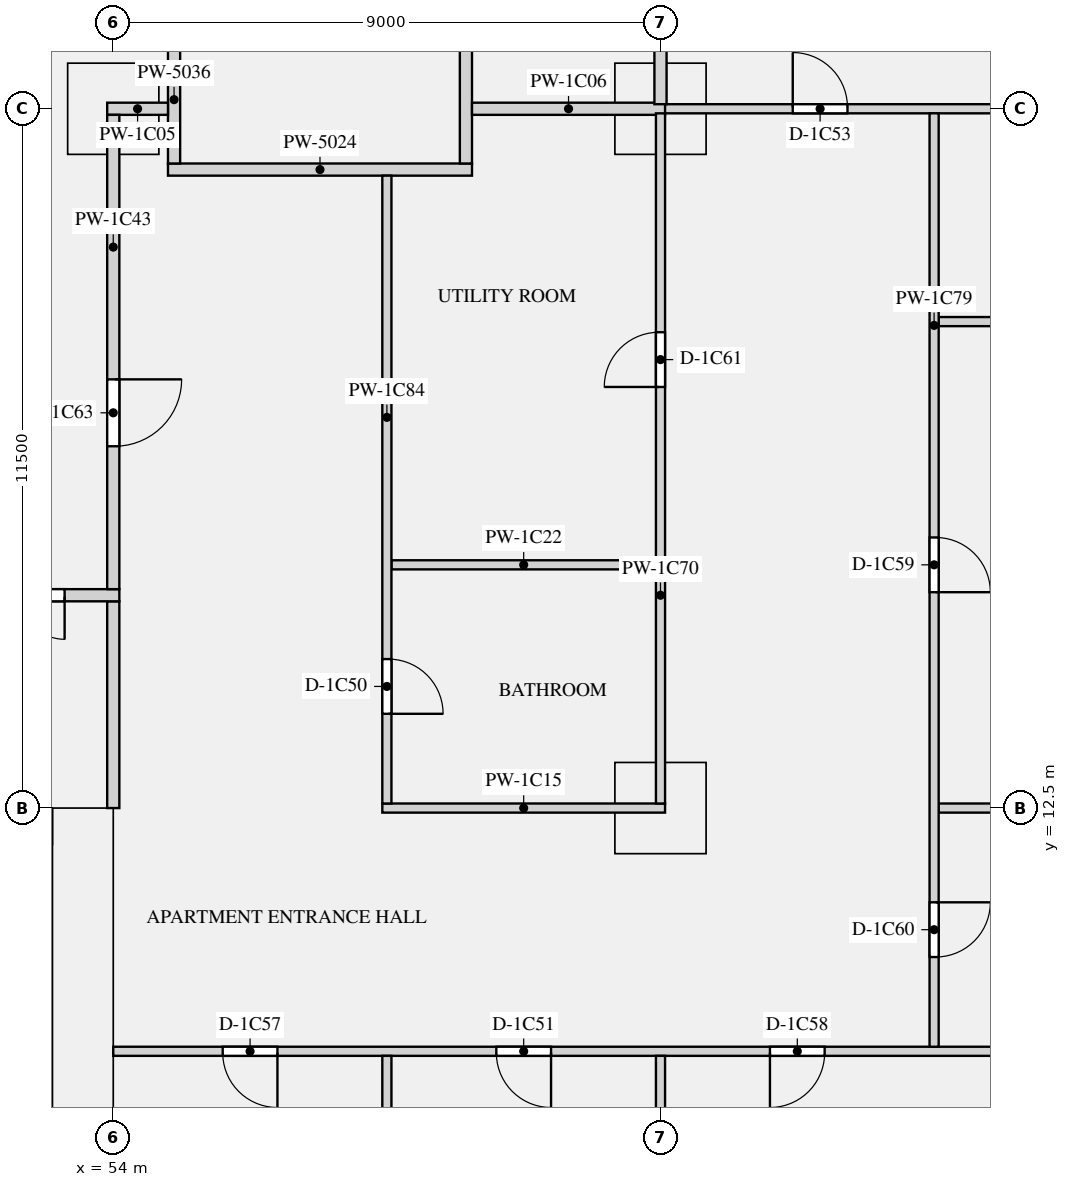
"""IFC4 building model, lengths in metres.
Left out: names, types, materials, properties, quantities, classifications, styles, units other than length and angle.
Written with IfcOpenShell. Run it as: python <this file> out.ifc"""

import sys

from ifc_helpers import new_model, si_unit, direction, frame, frame_2d, origin, origin_2d, place, context, subcontext, project, spatial, rectangle, extrude, element, fill, save


model = new_model("IFC4")
c1 = context("Model", 3, precision=1e-05, world=origin(), true_north=direction((0.0, 1.0)))
c2 = subcontext(c1, "Body", "Model", "MODEL_VIEW")
j1 = project(units=[si_unit("LENGTHUNIT", "METRE"), si_unit("PLANEANGLEUNIT", "RADIAN")], contexts=[c1])
p1 = place(None, origin())
s1 = spatial("IfcSite", under=j1, at=p1, CompositionType="ELEMENT")
p2 = place(p1, origin())
s2 = spatial("IfcBuilding", under=s1, at=p2, CompositionType="ELEMENT")
p3 = place(p2, frame((0.0, 0.0, 38.4)))
s3 = spatial("IfcBuildingStorey", under=s2, at=p3, CompositionType="ELEMENT", Elevation=38.4)
for number, where, z_axis, x_axis in (
    (1, (54.0, 24.0, 0.0), (0.0, 0.0, 1.0), (1.0, 0.0, 0.0)),
    (2, (63.0, 24.0, 0.0), (0.0, 0.0, 1.0), (1.0, 0.0, 0.0)),
    (3, (63.0, 12.5, 0.0), (0.0, 0.0, 1.0), (1.0, 0.0, 0.0)),
):
    element("IfcColumn", number, at=place(p3, frame(where, z_axis=z_axis, x_axis=x_axis)), inside=s3, PredefinedType="COLUMN", context=c2, shape_type="SweptSolid", body=[
        extrude(rectangle(XDim=1.5, YDim=1.5, at=origin_2d()), origin(), (0.0, 0.0, 1.0), 3.15),
    ])
p4 = place(p3, frame((53.5, 0.0, 0.0), z_axis=(0.0, 0.0, 1.0), x_axis=(0.0, 1.0, 0.0)))
e4 = element("IfcWall", 4, at=p4, inside=s3, PredefinedType="SHEAR", context=c2, shape_type="SweptSolid", body=[
    extrude(rectangle(XDim=12.5, YDim=1.0, at=frame_2d((6.25, 0.0))), origin(), (0.0, 0.0, 1.0), 3.15),
])
p5 = place(p3, frame((54.9, 23.0, 0.0), z_axis=(0.0, 0.0, 1.0), x_axis=(1.0, 0.0, 0.0)))
e5 = element("IfcWall", 5, at=p5, inside=s3, PredefinedType="PARTITIONING", context=c2, shape_type="SweptSolid", body=[
    extrude(rectangle(XDim=5.0, YDim=0.2, at=frame_2d((2.5, 0.0))), origin(), (0.0, 0.0, 1.0), 2.83),
])
p6 = place(p3, frame((54.0, 12.5, 0.0), z_axis=(0.0, 0.0, 1.0), x_axis=(0.0, 1.0, 0.0)))
e6 = element("IfcWall", 6, at=p6, inside=s3, PredefinedType="PARTITIONING", context=c2, shape_type="SweptSolid", body=[
    extrude(rectangle(XDim=3.4, YDim=0.2, at=frame_2d((1.7, 0.0))), origin(), (0.0, 0.0, 1.0), 2.83),
])
p7 = place(p3, frame((55.0, 23.1, 0.0), z_axis=(0.0, 0.0, 1.0), x_axis=(0.0, 1.0, 0.0)))
e7 = element("IfcWall", 7, at=p7, inside=s3, PredefinedType="PARTITIONING", context=c2, shape_type="SweptSolid", body=[
    extrude(rectangle(XDim=3.8, YDim=0.2, at=frame_2d((1.9, 0.0))), origin(), (0.0, 0.0, 1.0), 2.83),
])
p8 = place(p7, frame((2.1, 0.0, 0.0)))
e8 = element("IfcOpeningElement", 8, at=p8, cuts=e7, PredefinedType="OPENING", context=c2, shape_type="SweptSolid", body=[
    extrude(rectangle(XDim=1.2, YDim=2.1, at=frame_2d((0.6, 1.05))), frame((0.0, 0.11, 0.0), z_axis=(0.0, -1.0, 0.0), x_axis=(1.0, 0.0, 0.0)), (0.0, 0.0, 1.0), 0.22),
])
p9 = place(p3, frame((59.8, 23.1, 0.0), z_axis=(0.0, 0.0, 1.0), x_axis=(0.0, 1.0, 0.0)))
e9 = element("IfcWall", 9, at=p9, inside=s3, PredefinedType="PARTITIONING", context=c2, shape_type="SweptSolid", body=[
    extrude(rectangle(XDim=3.9, YDim=0.2, at=frame_2d((1.95, 0.0))), origin(), (0.0, 0.0, 1.0), 2.83),
])
p10 = place(p3, frame((62.925, 24.0, 0.0), z_axis=(0.0, 0.0, 1.0), x_axis=(1.0, 0.0, 0.0)))
e10 = element("IfcWall", 10, at=p10, inside=s3, PredefinedType="PARTITIONING", context=c2, shape_type="SweptSolid", body=[
    extrude(rectangle(XDim=10.275, YDim=0.15, at=frame_2d((5.137, 0.0))), origin(), (0.0, 0.0, 1.0), 2.83),
])
p11 = place(p10, frame((2.25, 0.0, 0.0)))
e11 = element("IfcOpeningElement", 11, at=p11, cuts=e10, PredefinedType="OPENING", context=c2, shape_type="SweptSolid", body=[
    extrude(rectangle(XDim=0.9, YDim=2.1, at=frame_2d((0.45, 1.05))), frame((0.0, 0.085, 0.0), z_axis=(0.0, -1.0, 0.0), x_axis=(1.0, 0.0, 0.0)), (0.0, 0.0, 1.0), 0.17),
])
p12 = place(p3, frame((53.9, 24.0, 0.0), z_axis=(0.0, 0.0, 1.0), x_axis=(1.0, 0.0, 0.0)))
e12 = element("IfcWall", 12, at=p12, inside=s3, PredefinedType="PARTITIONING", context=c2, shape_type="SweptSolid", body=[
    extrude(rectangle(XDim=1.0, YDim=0.2, at=frame_2d((0.5, 0.0))), origin(), (0.0, 0.0, 1.0), 2.83),
])
p13 = place(p3, frame((59.9, 24.0, 0.0), z_axis=(0.0, 0.0, 1.0), x_axis=(1.0, 0.0, 0.0)))
e13 = element("IfcWall", 13, at=p13, inside=s3, PredefinedType="PARTITIONING", context=c2, shape_type="SweptSolid", body=[
    extrude(rectangle(XDim=3.175, YDim=0.2, at=frame_2d((1.587, 0.0))), origin(), (0.0, 0.0, 1.0), 2.83),
])
p14 = place(p3, frame((54.0, 8.5, 0.0), z_axis=(0.0, 0.0, 1.0), x_axis=(1.0, 0.0, 0.0)))
e14 = element("IfcWall", 14, at=p14, inside=s3, PredefinedType="PARTITIONING", context=c2, shape_type="SweptSolid", body=[
    extrude(rectangle(XDim=21.7, YDim=0.15, at=frame_2d((10.85, 0.0))), origin(), (0.0, 0.0, 1.0), 2.83),
])
p15 = place(p14, frame((6.3, 0.0, 0.0)))
e15 = element("IfcOpeningElement", 15, at=p15, cuts=e14, PredefinedType="OPENING", context=c2, shape_type="SweptSolid", body=[
    extrude(rectangle(XDim=0.9, YDim=2.1, at=frame_2d((0.45, 1.05))), frame((0.0, 0.085, 0.0), z_axis=(0.0, -1.0, 0.0), x_axis=(1.0, 0.0, 0.0)), (0.0, 0.0, 1.0), 0.17),
])
p16 = place(p14, frame((1.8, 0.0, 0.0)))
e16 = element("IfcOpeningElement", 16, at=p16, cuts=e14, PredefinedType="OPENING", context=c2, shape_type="SweptSolid", body=[
    extrude(rectangle(XDim=0.9, YDim=2.1, at=frame_2d((0.45, 1.05))), frame((0.0, 0.085, 0.0), z_axis=(0.0, -1.0, 0.0), x_axis=(1.0, 0.0, 0.0)), (0.0, 0.0, 1.0), 0.17),
])
p17 = place(p14, frame((10.8, 0.0, 0.0)))
e17 = element("IfcOpeningElement", 17, at=p17, cuts=e14, PredefinedType="OPENING", context=c2, shape_type="SweptSolid", body=[
    extrude(rectangle(XDim=0.9, YDim=2.1, at=frame_2d((0.45, 1.05))), frame((0.0, 0.085, 0.0), z_axis=(0.0, -1.0, 0.0), x_axis=(1.0, 0.0, 0.0)), (0.0, 0.0, 1.0), 0.17),
])
p18 = place(p14, frame((19.175, 0.0, 0.0)))
e18 = element("IfcOpeningElement", 18, at=p18, cuts=e14, PredefinedType="OPENING", context=c2, shape_type="SweptSolid", body=[
    extrude(rectangle(XDim=1.5, YDim=2.1, at=frame_2d((0.75, 1.05))), frame((0.0, 0.085, 0.0), z_axis=(0.0, -1.0, 0.0), x_axis=(1.0, 0.0, 0.0)), (0.0, 0.0, 1.0), 0.17),
])
p19 = place(p3, frame((58.425, 12.5, 0.0), z_axis=(0.0, 0.0, 1.0), x_axis=(1.0, 0.0, 0.0)))
e19 = element("IfcWall", 19, at=p19, inside=s3, PredefinedType="PARTITIONING", context=c2, shape_type="SweptSolid", body=[
    extrude(rectangle(XDim=4.65, YDim=0.15, at=frame_2d((2.325, 0.0))), origin(), (0.0, 0.0, 1.0), 2.83),
])
p20 = place(p3, frame((67.575, 12.5, 0.0), z_axis=(0.0, 0.0, 1.0), x_axis=(1.0, 0.0, 0.0)))
e20 = element("IfcWall", 20, at=p20, inside=s3, PredefinedType="PARTITIONING", context=c2, shape_type="SweptSolid", body=[
    extrude(rectangle(XDim=8.125, YDim=0.15, at=frame_2d((4.062, 0.0))), origin(), (0.0, 0.0, 1.0), 2.83),
])
p21 = place(p3, frame((67.575, 20.5, 0.0), z_axis=(0.0, 0.0, 1.0), x_axis=(1.0, 0.0, 0.0)))
e21 = element("IfcWall", 21, at=p21, inside=s3, PredefinedType="PARTITIONING", context=c2, shape_type="SweptSolid", body=[
    extrude(rectangle(XDim=5.625, YDim=0.15, at=frame_2d((2.812, 0.0))), origin(), (0.0, 0.0, 1.0), 2.83),
])
p22 = place(p21, frame((1.775, 0.0, 0.0)))
e22 = element("IfcOpeningElement", 22, at=p22, cuts=e21, PredefinedType="OPENING", context=c2, shape_type="SweptSolid", body=[
    extrude(rectangle(XDim=0.8, YDim=2.1, at=frame_2d((0.4, 1.05))), frame((0.0, 0.085, 0.0), z_axis=(0.0, -1.0, 0.0), x_axis=(1.0, 0.0, 0.0)), (0.0, 0.0, 1.0), 0.17),
])
p23 = place(p3, frame((58.575, 16.5, 0.0), z_axis=(0.0, 0.0, 1.0), x_axis=(1.0, 0.0, 0.0)))
e23 = element("IfcWall", 23, at=p23, inside=s3, PredefinedType="PARTITIONING", context=c2, shape_type="SweptSolid", body=[
    extrude(rectangle(XDim=4.35, YDim=0.15, at=frame_2d((2.175, 0.0))), origin(), (0.0, 0.0, 1.0), 2.83),
])
p24 = place(p3, frame((17.9, 16.0, 0.0), z_axis=(0.0, 0.0, 1.0), x_axis=(1.0, 0.0, 0.0)))
e24 = element("IfcWall", 24, at=p24, inside=s3, PredefinedType="PARTITIONING", context=c2, shape_type="SweptSolid", body=[
    extrude(rectangle(XDim=36.2, YDim=0.2, at=frame_2d((18.1, 0.0))), origin(), (0.0, 0.0, 1.0), 2.83),
])
p25 = place(p24, frame((0.9, 0.0, 0.0)))
e25 = element("IfcOpeningElement", 25, at=p25, cuts=e24, PredefinedType="OPENING", context=c2, shape_type="SweptSolid", body=[
    extrude(rectangle(XDim=1.4, YDim=2.1, at=frame_2d((0.7, 1.05))), frame((0.0, 0.11, 0.0), z_axis=(0.0, -1.0, 0.0), x_axis=(1.0, 0.0, 0.0)), (0.0, 0.0, 1.0), 0.22),
])
p26 = place(p24, frame((33.9, 0.0, 0.0)))
e26 = element("IfcOpeningElement", 26, at=p26, cuts=e24, PredefinedType="OPENING", context=c2, shape_type="SweptSolid", body=[
    extrude(rectangle(XDim=1.4, YDim=2.1, at=frame_2d((0.7, 1.05))), frame((0.0, 0.11, 0.0), z_axis=(0.0, -1.0, 0.0), x_axis=(1.0, 0.0, 0.0)), (0.0, 0.0, 1.0), 0.22),
])
p27 = place(p3, frame((54.0, 16.1, 0.0), z_axis=(0.0, 0.0, 1.0), x_axis=(0.0, 1.0, 0.0)))
e27 = element("IfcWall", 27, at=p27, inside=s3, PredefinedType="PARTITIONING", context=c2, shape_type="SweptSolid", body=[
    extrude(rectangle(XDim=7.8, YDim=0.2, at=frame_2d((3.9, 0.0))), origin(), (0.0, 0.0, 1.0), 2.83),
])
p28 = place(p27, frame((2.35, 0.0, 0.0)))
e28 = element("IfcOpeningElement", 28, at=p28, cuts=e27, PredefinedType="OPENING", context=c2, shape_type="SweptSolid", body=[
    extrude(rectangle(XDim=1.1, YDim=2.1, at=frame_2d((0.55, 1.05))), frame((0.0, 0.11, 0.0), z_axis=(0.0, -1.0, 0.0), x_axis=(1.0, 0.0, 0.0)), (0.0, 0.0, 1.0), 0.22),
])
p29 = place(p3, frame((63.0, 0.8, 0.0), z_axis=(0.0, 0.0, 1.0), x_axis=(0.0, 1.0, 0.0)))
e29 = element("IfcWall", 29, at=p29, inside=s3, PredefinedType="PARTITIONING", context=c2, shape_type="SweptSolid", body=[
    extrude(rectangle(XDim=7.625, YDim=0.15, at=frame_2d((3.812, 0.0))), origin(), (0.0, 0.0, 1.0), 2.83),
])
p30 = place(p3, frame((63.0, 12.575, 0.0), z_axis=(0.0, 0.0, 1.0), x_axis=(0.0, 1.0, 0.0)))
e30 = element("IfcWall", 30, at=p30, inside=s3, PredefinedType="PARTITIONING", context=c2, shape_type="SweptSolid", body=[
    extrude(rectangle(XDim=11.35, YDim=0.15, at=frame_2d((5.675, 0.0))), origin(), (0.0, 0.0, 1.0), 2.83),
])
p31 = place(p30, frame((6.85, 0.0, 0.0)))
e31 = element("IfcOpeningElement", 31, at=p31, cuts=e30, PredefinedType="OPENING", context=c2, shape_type="SweptSolid", body=[
    extrude(rectangle(XDim=0.9, YDim=2.1, at=frame_2d((0.45, 1.05))), frame((0.0, 0.085, 0.0), z_axis=(0.0, -1.0, 0.0), x_axis=(1.0, 0.0, 0.0)), (0.0, 0.0, 1.0), 0.17),
])
p32 = place(p3, frame((63.0, 24.075, 0.0), z_axis=(0.0, 0.0, 1.0), x_axis=(0.0, 1.0, 0.0)))
e32 = element("IfcWall", 32, at=p32, inside=s3, PredefinedType="PARTITIONING", context=c2, shape_type="SweptSolid", body=[
    extrude(rectangle(XDim=12.075, YDim=0.2, at=frame_2d((6.038, 0.0))), origin(), (0.0, 0.0, 1.0), 2.83),
])
p33 = place(p3, frame((67.5, 8.575, 0.0), z_axis=(0.0, 0.0, 1.0), x_axis=(0.0, 1.0, 0.0)))
e33 = element("IfcWall", 33, at=p33, inside=s3, PredefinedType="PARTITIONING", context=c2, shape_type="SweptSolid", body=[
    extrude(rectangle(XDim=15.35, YDim=0.15, at=frame_2d((7.675, 0.0))), origin(), (0.0, 0.0, 1.0), 2.83),
])
p34 = place(p33, frame((7.475, 0.0, 0.0)))
e34 = element("IfcOpeningElement", 34, at=p34, cuts=e33, PredefinedType="OPENING", context=c2, shape_type="SweptSolid", body=[
    extrude(rectangle(XDim=0.9, YDim=2.1, at=frame_2d((0.45, 1.05))), frame((0.0, 0.085, 0.0), z_axis=(0.0, -1.0, 0.0), x_axis=(1.0, 0.0, 0.0)), (0.0, 0.0, 1.0), 0.17),
])
p35 = place(p33, frame((1.475, 0.0, 0.0)))
e35 = element("IfcOpeningElement", 35, at=p35, cuts=e33, PredefinedType="OPENING", context=c2, shape_type="SweptSolid", body=[
    extrude(rectangle(XDim=0.9, YDim=2.1, at=frame_2d((0.45, 1.05))), frame((0.0, 0.085, 0.0), z_axis=(0.0, -1.0, 0.0), x_axis=(1.0, 0.0, 0.0)), (0.0, 0.0, 1.0), 0.17),
])
p36 = place(p3, frame((58.5, 0.8, 0.0), z_axis=(0.0, 0.0, 1.0), x_axis=(0.0, 1.0, 0.0)))
e36 = element("IfcWall", 36, at=p36, inside=s3, PredefinedType="PARTITIONING", context=c2, shape_type="SweptSolid", body=[
    extrude(rectangle(XDim=7.625, YDim=0.15, at=frame_2d((3.812, 0.0))), origin(), (0.0, 0.0, 1.0), 2.83),
])
p37 = place(p3, frame((58.5, 12.575, 0.0), z_axis=(0.0, 0.0, 1.0), x_axis=(0.0, 1.0, 0.0)))
e37 = element("IfcWall", 37, at=p37, inside=s3, PredefinedType="PARTITIONING", context=c2, shape_type="SweptSolid", body=[
    extrude(rectangle(XDim=10.325, YDim=0.15, at=frame_2d((5.163, 0.0))), origin(), (0.0, 0.0, 1.0), 2.83),
])
p38 = place(p37, frame((1.475, 0.0, 0.0)))
e38 = element("IfcOpeningElement", 38, at=p38, cuts=e37, PredefinedType="OPENING", context=c2, shape_type="SweptSolid", body=[
    extrude(rectangle(XDim=0.9, YDim=2.1, at=frame_2d((0.45, 1.05))), frame((0.0, 0.085, 0.0), z_axis=(0.0, -1.0, 0.0), x_axis=(1.0, 0.0, 0.0)), (0.0, 0.0, 1.0), 0.17),
])
p39 = place(p26, frame((1.4, 0.0, 0.0), z_axis=(0.0, 0.0, 1.0), x_axis=(-1.0, 0.0, 0.0)))
e39 = element("IfcDoor", 39, at=p39, inside=s3, OperationType="DOUBLE_DOOR_SINGLE_SWING", PredefinedType="DOOR", context=c2, shape_type="SweptSolid", body=[
    extrude(rectangle(XDim=1.4, YDim=2.1, at=frame_2d((0.7, 1.05))), frame((0.0, 0.025, 0.0), z_axis=(0.0, -1.0, 0.0), x_axis=(1.0, 0.0, 0.0)), (0.0, 0.0, 1.0), 0.05),
])
fill(e26, e39)
p40 = place(p38, frame((0.9, 0.0, 0.0), z_axis=(0.0, 0.0, 1.0), x_axis=(-1.0, 0.0, 0.0)))
e40 = element("IfcDoor", 40, at=p40, inside=s3, OperationType="SINGLE_SWING_RIGHT", PredefinedType="DOOR", context=c2, shape_type="SweptSolid", body=[
    extrude(rectangle(XDim=0.9, YDim=2.1, at=frame_2d((0.45, 1.05))), frame((0.0, 0.025, 0.0), z_axis=(0.0, -1.0, 0.0), x_axis=(1.0, 0.0, 0.0)), (0.0, 0.0, 1.0), 0.05),
])
fill(e38, e40)
p41 = place(p15, frame((0.9, 0.0, 0.0), z_axis=(0.0, 0.0, 1.0), x_axis=(-1.0, 0.0, 0.0)))
e41 = element("IfcDoor", 41, at=p41, inside=s3, OperationType="SINGLE_SWING_LEFT", PredefinedType="DOOR", context=c2, shape_type="SweptSolid", body=[
    extrude(rectangle(XDim=0.9, YDim=2.1, at=frame_2d((0.45, 1.05))), frame((0.0, 0.025, 0.0), z_axis=(0.0, -1.0, 0.0), x_axis=(1.0, 0.0, 0.0)), (0.0, 0.0, 1.0), 0.05),
])
fill(e15, e41)
p42 = place(p11, origin())
e42 = element("IfcDoor", 42, at=p42, inside=s3, OperationType="SINGLE_SWING_LEFT", PredefinedType="DOOR", context=c2, shape_type="SweptSolid", body=[
    extrude(rectangle(XDim=0.9, YDim=2.1, at=frame_2d((0.45, 1.05))), frame((0.0, 0.025, 0.0), z_axis=(0.0, -1.0, 0.0), x_axis=(1.0, 0.0, 0.0)), (0.0, 0.0, 1.0), 0.05),
])
fill(e11, e42)
p43 = place(p16, frame((0.9, 0.0, 0.0), z_axis=(0.0, 0.0, 1.0), x_axis=(-1.0, 0.0, 0.0)))
e43 = element("IfcDoor", 43, at=p43, inside=s3, OperationType="SINGLE_SWING_LEFT", PredefinedType="DOOR", context=c2, shape_type="SweptSolid", body=[
    extrude(rectangle(XDim=0.9, YDim=2.1, at=frame_2d((0.45, 1.05))), frame((0.0, 0.025, 0.0), z_axis=(0.0, -1.0, 0.0), x_axis=(1.0, 0.0, 0.0)), (0.0, 0.0, 1.0), 0.05),
])
fill(e16, e43)
p44 = place(p17, frame((0.9, 0.0, 0.0), z_axis=(0.0, 0.0, 1.0), x_axis=(-1.0, 0.0, 0.0)))
e44 = element("IfcDoor", 44, at=p44, inside=s3, OperationType="SINGLE_SWING_RIGHT", PredefinedType="DOOR", context=c2, shape_type="SweptSolid", body=[
    extrude(rectangle(XDim=0.9, YDim=2.1, at=frame_2d((0.45, 1.05))), frame((0.0, 0.025, 0.0), z_axis=(0.0, -1.0, 0.0), x_axis=(1.0, 0.0, 0.0)), (0.0, 0.0, 1.0), 0.05),
])
fill(e17, e44)
p45 = place(p34, frame((0.9, 0.0, 0.0), z_axis=(0.0, 0.0, 1.0), x_axis=(-1.0, 0.0, 0.0)))
e45 = element("IfcDoor", 45, at=p45, inside=s3, OperationType="SINGLE_SWING_RIGHT", PredefinedType="DOOR", context=c2, shape_type="SweptSolid", body=[
    extrude(rectangle(XDim=0.9, YDim=2.1, at=frame_2d((0.45, 1.05))), frame((0.0, 0.025, 0.0), z_axis=(0.0, -1.0, 0.0), x_axis=(1.0, 0.0, 0.0)), (0.0, 0.0, 1.0), 0.05),
])
fill(e34, e45)
p46 = place(p35, frame((0.9, 0.0, 0.0), z_axis=(0.0, 0.0, 1.0), x_axis=(-1.0, 0.0, 0.0)))
e46 = element("IfcDoor", 46, at=p46, inside=s3, OperationType="SINGLE_SWING_LEFT", PredefinedType="DOOR", context=c2, shape_type="SweptSolid", body=[
    extrude(rectangle(XDim=0.9, YDim=2.1, at=frame_2d((0.45, 1.05))), frame((0.0, 0.025, 0.0), z_axis=(0.0, -1.0, 0.0), x_axis=(1.0, 0.0, 0.0)), (0.0, 0.0, 1.0), 0.05),
])
fill(e35, e46)
p47 = place(p31, origin())
e47 = element("IfcDoor", 47, at=p47, inside=s3, OperationType="SINGLE_SWING_LEFT", PredefinedType="DOOR", context=c2, shape_type="SweptSolid", body=[
    extrude(rectangle(XDim=0.9, YDim=2.1, at=frame_2d((0.45, 1.05))), frame((0.0, 0.025, 0.0), z_axis=(0.0, -1.0, 0.0), x_axis=(1.0, 0.0, 0.0)), (0.0, 0.0, 1.0), 0.05),
])
fill(e31, e47)
p48 = place(p28, frame((1.1, 0.0, 0.0), z_axis=(0.0, 0.0, 1.0), x_axis=(-1.0, 0.0, 0.0)))
e48 = element("IfcDoor", 48, at=p48, inside=s3, OperationType="SINGLE_SWING_LEFT", PredefinedType="DOOR", context=c2, shape_type="SweptSolid", body=[
    extrude(rectangle(XDim=1.1, YDim=2.1, at=frame_2d((0.55, 1.05))), frame((0.0, 0.025, 0.0), z_axis=(0.0, -1.0, 0.0), x_axis=(1.0, 0.0, 0.0)), (0.0, 0.0, 1.0), 0.05),
])
fill(e28, e48)
save(model, sys.argv[1])
